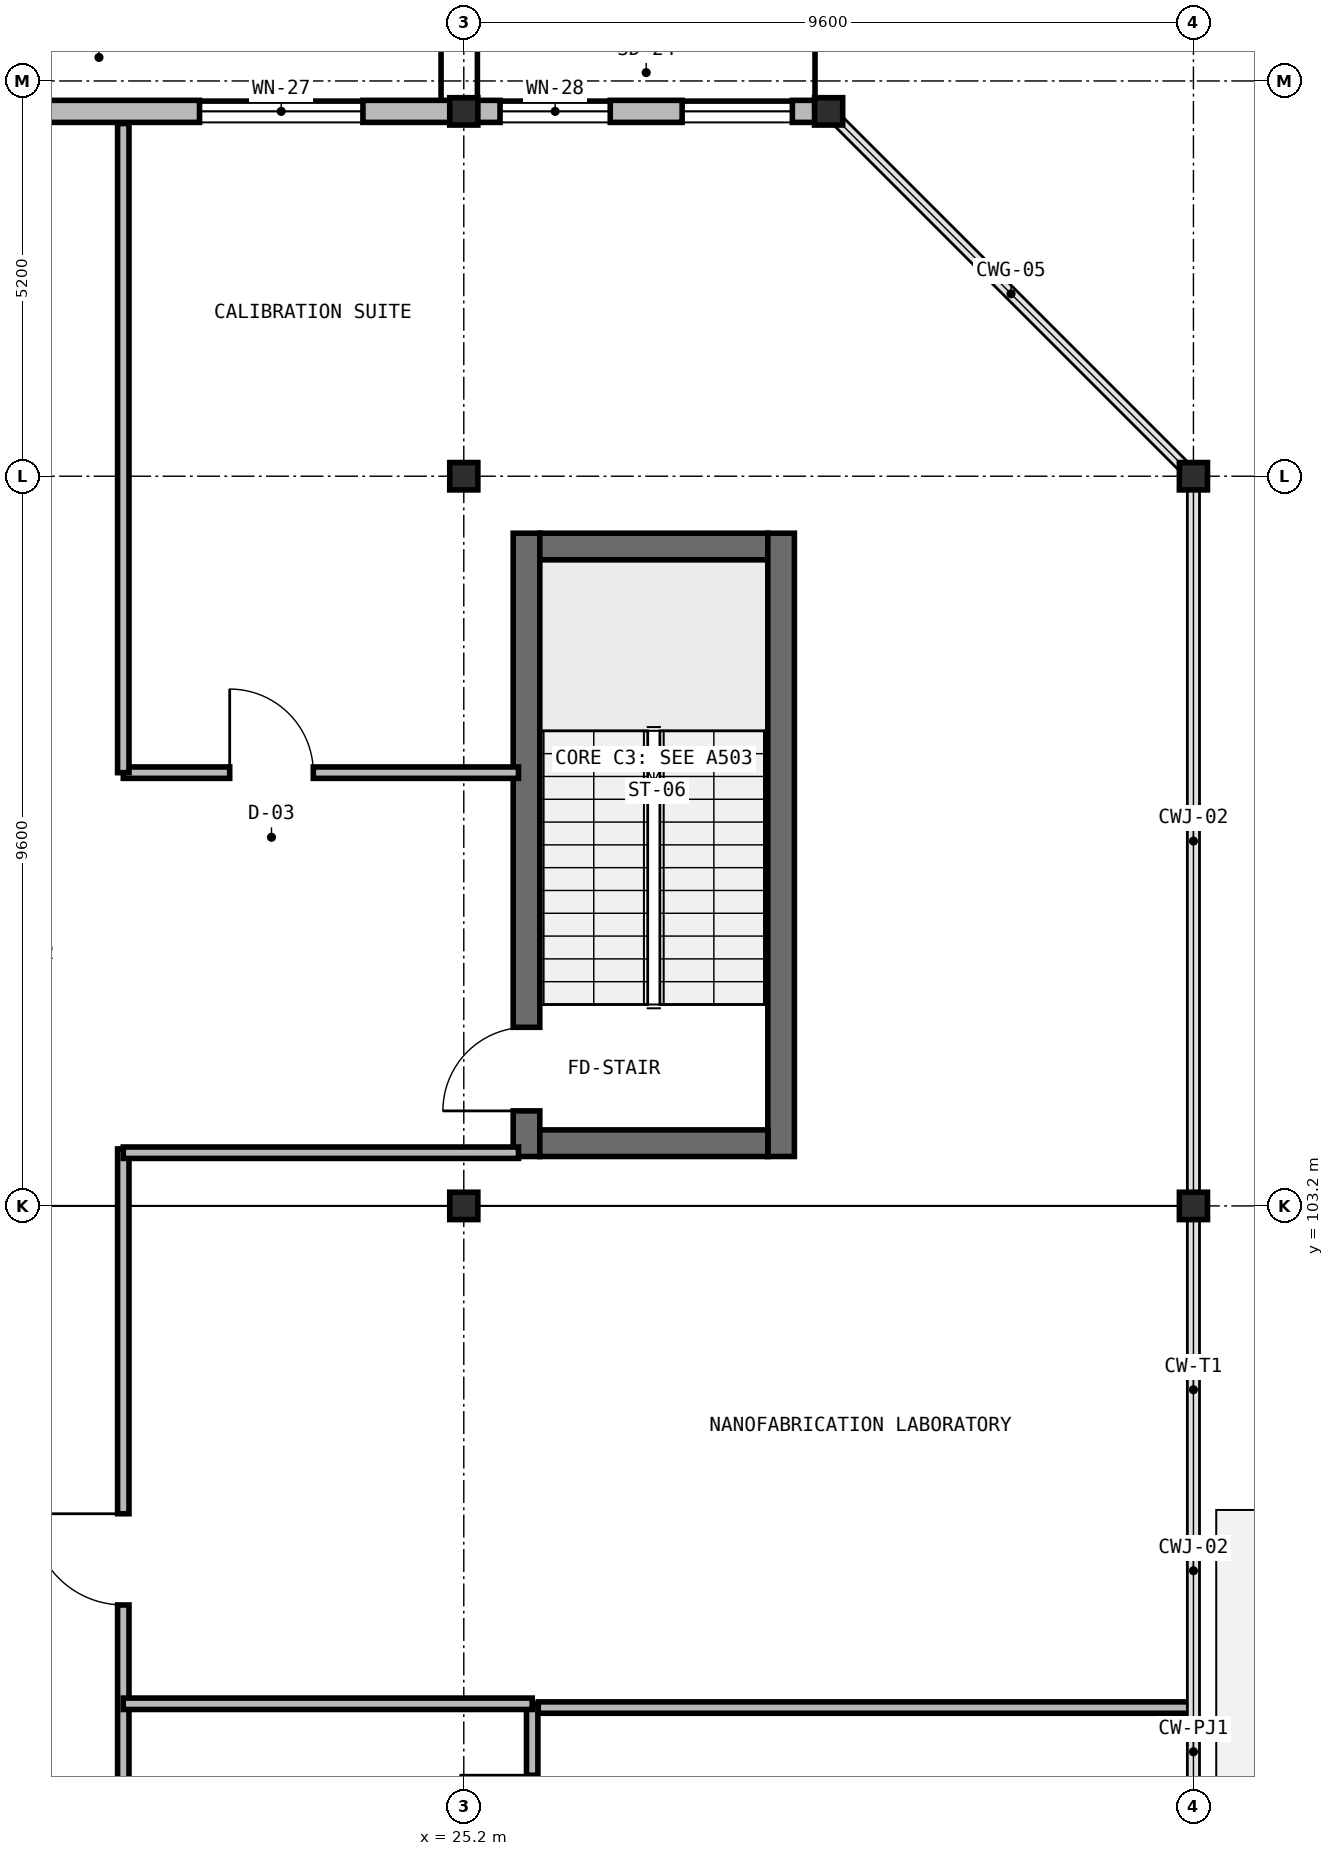
"""IFC4 building model, lengths in metres.
Left out: names, types, materials, properties, quantities, classifications, styles, units other than length and angle.
Written with IfcOpenShell. Run it as: python <this file> out.ifc"""

import sys

from ifc_helpers import new_model, si_unit, direction, frame, frame_2d, origin, origin_2d, place, context, subcontext, project, spatial, rectangle, i_section, extrude, element, fill, save


model = new_model("IFC4")
c1 = context("Model", 3, precision=1e-05, world=origin(), true_north=direction((0.0, 1.0)))
c2 = subcontext(c1, "Body", "Model", "MODEL_VIEW")
j1 = project(units=[si_unit("LENGTHUNIT", "METRE"), si_unit("PLANEANGLEUNIT", "RADIAN")], contexts=[c1])
p1 = place(None, origin())
s1 = spatial("IfcSite", under=j1, at=p1, CompositionType="ELEMENT")
p2 = place(p1, origin())
s2 = spatial("IfcBuilding", under=s1, at=p2, CompositionType="ELEMENT")
p3 = place(p2, frame((0.0, 0.0, 9.8)))
s3 = spatial("IfcBuildingStorey", under=s2, at=p3, CompositionType="ELEMENT", Elevation=9.8)
p4 = place(p3, frame((26.025, 103.85, 0.0), z_axis=(0.0, 0.0, 1.0), x_axis=(0.0, 1.0, 0.0)))
e1 = element("IfcWall", 1, at=p4, inside=s3, PredefinedType="SHEAR", context=c2, shape_type="SweptSolid", body=[
    extrude(rectangle(XDim=8.2, YDim=0.35, at=frame_2d((4.1, 0.0))), origin(), (0.0, 0.0, 1.0), 4.55),
])
p5 = place(p4, frame((0.6, 0.0, 0.0)))
e2 = element("IfcOpeningElement", 2, at=p5, cuts=e1, PredefinedType="OPENING", context=c2, shape_type="SweptSolid", body=[
    extrude(rectangle(XDim=1.1, YDim=2.15, at=frame_2d((0.55, 1.075))), frame((0.0, 0.185, 0.0), z_axis=(0.0, -1.0, 0.0), x_axis=(1.0, 0.0, 0.0)), (0.0, 0.0, 1.0), 0.37),
])
p6 = place(p3, frame((26.2, 111.875, 0.0), z_axis=(0.0, 0.0, 1.0), x_axis=(1.0, 0.0, 0.0)))
e3 = element("IfcWall", 3, at=p6, inside=s3, PredefinedType="SHEAR", context=c2, shape_type="SweptSolid", body=[
    extrude(rectangle(XDim=3.0, YDim=0.35, at=frame_2d((1.5, 0.0))), origin(), (0.0, 0.0, 1.0), 4.55),
])
p7 = place(p3, frame((29.375, 112.05, 0.0), z_axis=(0.0, 0.0, 1.0), x_axis=(0.0, -1.0, 0.0)))
e4 = element("IfcWall", 4, at=p7, inside=s3, PredefinedType="SHEAR", context=c2, shape_type="SweptSolid", body=[
    extrude(rectangle(XDim=8.2, YDim=0.35, at=frame_2d((4.1, 0.0))), origin(), (0.0, 0.0, 1.0), 4.55),
])
p8 = place(p3, frame((29.2, 104.025, 0.0), z_axis=(0.0, 0.0, 1.0), x_axis=(-1.0, 0.0, 0.0)))
e5 = element("IfcWall", 5, at=p8, inside=s3, PredefinedType="SHEAR", context=c2, shape_type="SweptSolid", body=[
    extrude(rectangle(XDim=3.0, YDim=0.35, at=frame_2d((1.5, 0.0))), origin(), (0.0, 0.0, 1.0), 4.55),
])
for number, where, z_axis, x_axis in (
    (6, (25.2, 103.2, 0.0), (0.0, 0.0, 1.0), (1.0, 0.0, 0.0)),
    (7, (25.2, 112.8, 0.0), (0.0, 0.0, 1.0), (1.0, 0.0, 0.0)),
    (8, (25.2, 117.6, 0.0), (0.0, 0.0, 1.0), (1.0, 0.0, 0.0)),
    (9, (34.8, 103.2, 0.0), (0.0, 0.0, 1.0), (1.0, 0.0, 0.0)),
    (10, (34.8, 112.8, 0.0), (0.0, 0.0, 1.0), (1.0, 0.0, 0.0)),
    (11, (30.0, 117.6, 0.0), (0.0, 0.0, 1.0), (1.0, 0.0, 0.0)),
):
    element("IfcColumn", number, at=place(p3, frame(where, z_axis=z_axis, x_axis=x_axis)), inside=s3, PredefinedType="COLUMN", context=c2, shape_type="SweptSolid", body=[
        extrude(i_section(OverallWidth=0.37, OverallDepth=0.36, WebThickness=0.014, FlangeThickness=0.022, at=origin_2d()), origin(), (0.0, 0.0, 1.0), 4.55),
    ])
p9 = place(p3, frame((15.604, 117.6, 0.0), z_axis=(0.0, 0.0, 1.0), x_axis=(1.0, 0.0, 0.0)))
e12 = element("IfcWall", 12, at=p9, inside=s3, PredefinedType="SOLIDWALL", context=c2, shape_type="SweptSolid", body=[
    extrude(rectangle(XDim=9.592, YDim=0.29, at=frame_2d((4.796, 0.0))), origin(), (0.0, 0.0, 1.0), 3.884),
])
p10 = place(p9, frame((6.119, 0.0, 0.95)))
e13 = element("IfcOpeningElement", 13, at=p10, cuts=e12, PredefinedType="OPENING", context=c2, shape_type="SweptSolid", body=[
    extrude(rectangle(XDim=2.15, YDim=1.59, at=frame_2d((1.075, 0.795))), frame((0.0, 0.155, 0.0), z_axis=(0.0, -1.0, 0.0), x_axis=(1.0, 0.0, 0.0)), (0.0, 0.0, 1.0), 0.31),
])
p11 = place(p3, frame((25.204, 117.6, 0.0), z_axis=(0.0, 0.0, 1.0), x_axis=(1.0, 0.0, 0.0)))
e14 = element("IfcWall", 14, at=p11, inside=s3, PredefinedType="SOLIDWALL", context=c2, shape_type="SweptSolid", body=[
    extrude(rectangle(XDim=4.792, YDim=0.29, at=frame_2d((2.396, 0.0))), origin(), (0.0, 0.0, 1.0), 4.37),
])
p12 = place(p11, frame((0.473, 0.0, 0.95)))
e15 = element("IfcOpeningElement", 15, at=p12, cuts=e14, PredefinedType="OPENING", context=c2, shape_type="SweptSolid", body=[
    extrude(rectangle(XDim=1.45, YDim=1.51, at=frame_2d((0.725, 0.755))), frame((0.0, 0.155, 0.0), z_axis=(0.0, -1.0, 0.0), x_axis=(1.0, 0.0, 0.0)), (0.0, 0.0, 1.0), 0.31),
])
p13 = place(p11, frame((2.869, 0.0, 0.95)))
e16 = element("IfcOpeningElement", 16, at=p13, cuts=e14, PredefinedType="OPENING", context=c2, shape_type="SweptSolid", body=[
    extrude(rectangle(XDim=1.45, YDim=1.51, at=frame_2d((0.725, 0.755))), frame((0.0, 0.155, 0.0), z_axis=(0.0, -1.0, 0.0), x_axis=(1.0, 0.0, 0.0)), (0.0, 0.0, 1.0), 0.31),
])
p14 = place(p3, frame((26.18, 96.6, 0.0), z_axis=(0.0, 0.0, 1.0), x_axis=(1.0, 0.0, 0.0)))
e17 = element("IfcWall", 17, at=p14, inside=s3, PredefinedType="PARTITIONING", context=c2, shape_type="SweptSolid", body=[
    extrude(rectangle(XDim=8.56, YDim=0.15, at=frame_2d((4.28, 0.0))), origin(), (0.0, 0.0, 1.0), 4.3),
])
p15 = place(p3, frame((26.1, 89.12, 0.0), z_axis=(0.0, 0.0, 1.0), x_axis=(0.0, 1.0, 0.0)))
e18 = element("IfcWall", 18, at=p15, inside=s3, PredefinedType="PARTITIONING", context=c2, shape_type="SweptSolid", body=[
    extrude(rectangle(XDim=7.53, YDim=0.15, at=frame_2d((3.765, 0.0))), origin(), (0.0, 0.0, 1.0), 4.3),
])
p16 = place(p15, frame((0.66, 0.0, 0.0)))
e19 = element("IfcOpeningElement", 19, at=p16, cuts=e18, PredefinedType="OPENING", context=c2, shape_type="SweptSolid", body=[
    extrude(rectangle(XDim=0.95, YDim=2.1, at=frame_2d((0.475, 1.05))), frame((0.0, 0.085, 0.0), z_axis=(0.0, -1.0, 0.0), x_axis=(1.0, 0.0, 0.0)), (0.0, 0.0, 1.0), 0.17),
])
p17 = place(p15, frame((2.44, 0.0, 0.0)))
e20 = element("IfcOpeningElement", 20, at=p17, cuts=e18, PredefinedType="OPENING", context=c2, shape_type="SweptSolid", body=[
    extrude(rectangle(XDim=0.95, YDim=2.1, at=frame_2d((0.475, 1.05))), frame((0.0, 0.085, 0.0), z_axis=(0.0, -1.0, 0.0), x_axis=(1.0, 0.0, 0.0)), (0.0, 0.0, 1.0), 0.17),
])
p18 = place(p15, frame((5.64, 0.0, 0.0)))
e21 = element("IfcOpeningElement", 21, at=p18, cuts=e18, PredefinedType="OPENING", context=c2, shape_type="SweptSolid", body=[
    extrude(rectangle(XDim=0.95, YDim=2.1, at=frame_2d((0.475, 1.05))), frame((0.0, 0.085, 0.0), z_axis=(0.0, -1.0, 0.0), x_axis=(1.0, 0.0, 0.0)), (0.0, 0.0, 1.0), 0.17),
])
p19 = place(p3, frame((20.72, 108.9, 0.0), z_axis=(0.0, 0.0, 1.0), x_axis=(1.0, 0.0, 0.0)))
e22 = element("IfcWall", 22, at=p19, inside=s3, PredefinedType="PARTITIONING", context=c2, shape_type="SweptSolid", body=[
    extrude(rectangle(XDim=5.2, YDim=0.15, at=frame_2d((2.6, 0.0))), origin(), (0.0, 0.0, 1.0), 4.3),
])
p20 = place(p19, frame((1.4, 0.0, 0.0)))
e23 = element("IfcOpeningElement", 23, at=p20, cuts=e22, PredefinedType="OPENING", context=c2, shape_type="SweptSolid", body=[
    extrude(rectangle(XDim=1.1, YDim=2.2, at=frame_2d((0.55, 1.1))), frame((0.0, 0.085, 0.0), z_axis=(0.0, -1.0, 0.0), x_axis=(1.0, 0.0, 0.0)), (0.0, 0.0, 1.0), 0.17),
])
p21 = place(p3, frame((20.72, 108.9, 0.0), z_axis=(0.0, 0.0, 1.0), x_axis=(0.0, 1.0, 0.0)))
e24 = element("IfcWall", 24, at=p21, inside=s3, PredefinedType="PARTITIONING", context=c2, shape_type="SweptSolid", body=[
    extrude(rectangle(XDim=8.54, YDim=0.15, at=frame_2d((4.27, 0.0))), origin(), (0.0, 0.0, 1.0), 4.3),
])
p22 = place(p3, frame((20.72, 91.15, 0.0), z_axis=(0.0, 0.0, 1.0), x_axis=(0.0, 1.0, 0.0)))
e25 = element("IfcWall", 25, at=p22, inside=s3, PredefinedType="PARTITIONING", context=c2, shape_type="SweptSolid", body=[
    extrude(rectangle(XDim=12.8, YDim=0.15, at=frame_2d((6.4, 0.0))), origin(), (0.0, 0.0, 1.0), 4.3),
])
p23 = place(p22, frame((1.8, 0.0, 0.0)))
e26 = element("IfcOpeningElement", 26, at=p23, cuts=e25, PredefinedType="OPENING", context=c2, shape_type="SweptSolid", body=[
    extrude(rectangle(XDim=1.1, YDim=2.2, at=frame_2d((0.55, 1.1))), frame((0.0, 0.085, 0.0), z_axis=(0.0, -1.0, 0.0), x_axis=(1.0, 0.0, 0.0)), (0.0, 0.0, 1.0), 0.17),
])
p24 = place(p22, frame((6.8, 0.0, 0.0)))
e27 = element("IfcOpeningElement", 27, at=p24, cuts=e25, PredefinedType="OPENING", context=c2, shape_type="SweptSolid", body=[
    extrude(rectangle(XDim=1.2, YDim=2.2, at=frame_2d((0.6, 1.1))), frame((0.0, 0.085, 0.0), z_axis=(0.0, -1.0, 0.0), x_axis=(1.0, 0.0, 0.0)), (0.0, 0.0, 1.0), 0.17),
])
p25 = place(p3, frame((20.72, 103.9, 0.0), z_axis=(0.0, 0.0, 1.0), x_axis=(1.0, 0.0, 0.0)))
e28 = element("IfcWall", 28, at=p25, inside=s3, PredefinedType="PARTITIONING", context=c2, shape_type="SweptSolid", body=[
    extrude(rectangle(XDim=5.2, YDim=0.15, at=frame_2d((2.6, 0.0))), origin(), (0.0, 0.0, 1.0), 4.3),
])
p26 = place(p3, frame((20.72, 96.65, 0.0), z_axis=(0.0, 0.0, 1.0), x_axis=(1.0, 0.0, 0.0)))
e29 = element("IfcWall", 29, at=p26, inside=s3, PredefinedType="PARTITIONING", context=c2, shape_type="SweptSolid", body=[
    extrude(rectangle(XDim=5.38, YDim=0.15, at=frame_2d((2.69, 0.0))), origin(), (0.0, 0.0, 1.0), 4.3),
])
p27 = place(p10, origin())
e30 = element("IfcWindow", 30, at=p27, inside=s3, PartitioningType="SINGLE_PANEL", PredefinedType="WINDOW", context=c2, shape_type="SweptSolid", body=[
    extrude(rectangle(XDim=2.15, YDim=1.59, at=frame_2d((1.075, 0.795))), frame((0.0, 0.03, 0.0), z_axis=(0.0, -1.0, 0.0), x_axis=(1.0, 0.0, 0.0)), (0.0, 0.0, 1.0), 0.06),
])
fill(e13, e30)
p28 = place(p12, origin())
e31 = element("IfcWindow", 31, at=p28, inside=s3, PartitioningType="SINGLE_PANEL", PredefinedType="WINDOW", context=c2, shape_type="SweptSolid", body=[
    extrude(rectangle(XDim=1.45, YDim=1.51, at=frame_2d((0.725, 0.755))), frame((0.0, 0.03, 0.0), z_axis=(0.0, -1.0, 0.0), x_axis=(1.0, 0.0, 0.0)), (0.0, 0.0, 1.0), 0.06),
])
fill(e15, e31)
p29 = place(p13, origin())
e32 = element("IfcWindow", 32, at=p29, inside=s3, PartitioningType="SINGLE_PANEL", PredefinedType="WINDOW", context=c2, shape_type="SweptSolid", body=[
    extrude(rectangle(XDim=1.45, YDim=1.51, at=frame_2d((0.725, 0.755))), frame((0.0, 0.03, 0.0), z_axis=(0.0, -1.0, 0.0), x_axis=(1.0, 0.0, 0.0)), (0.0, 0.0, 1.0), 0.06),
])
fill(e16, e32)
p30 = place(p5, origin())
e33 = element("IfcDoor", 33, at=p30, inside=s3, OperationType="SINGLE_SWING_LEFT", PredefinedType="DOOR", context=c2, shape_type="SweptSolid", body=[
    extrude(rectangle(XDim=1.1, YDim=2.15, at=frame_2d((0.55, 1.075))), frame((0.0, 0.025, 0.0), z_axis=(0.0, -1.0, 0.0), x_axis=(1.0, 0.0, 0.0)), (0.0, 0.0, 1.0), 0.05),
])
fill(e2, e33)
p31 = place(p18, origin())
e34 = element("IfcDoor", 34, at=p31, inside=s3, OperationType="SINGLE_SWING_RIGHT", PredefinedType="DOOR", context=c2, shape_type="SweptSolid", body=[
    extrude(rectangle(XDim=0.95, YDim=2.1, at=frame_2d((0.475, 1.05))), frame((0.0, 0.025, 0.0), z_axis=(0.0, -1.0, 0.0), x_axis=(1.0, 0.0, 0.0)), (0.0, 0.0, 1.0), 0.05),
])
fill(e21, e34)
p32 = place(p20, origin())
e35 = element("IfcDoor", 35, at=p32, inside=s3, OperationType="SINGLE_SWING_LEFT", PredefinedType="DOOR", context=c2, shape_type="SweptSolid", body=[
    extrude(rectangle(XDim=1.1, YDim=2.2, at=frame_2d((0.55, 1.1))), frame((0.0, 0.025, 0.0), z_axis=(0.0, -1.0, 0.0), x_axis=(1.0, 0.0, 0.0)), (0.0, 0.0, 1.0), 0.05),
])
fill(e23, e35)
p33 = place(p24, origin())
e36 = element("IfcDoor", 36, at=p33, inside=s3, OperationType="SINGLE_SWING_RIGHT", PredefinedType="DOOR", context=c2, shape_type="SweptSolid", body=[
    extrude(rectangle(XDim=1.2, YDim=2.2, at=frame_2d((0.6, 1.1))), frame((0.0, 0.025, 0.0), z_axis=(0.0, -1.0, 0.0), x_axis=(1.0, 0.0, 0.0)), (0.0, 0.0, 1.0), 0.05),
])
fill(e27, e36)
save(model, sys.argv[1])
